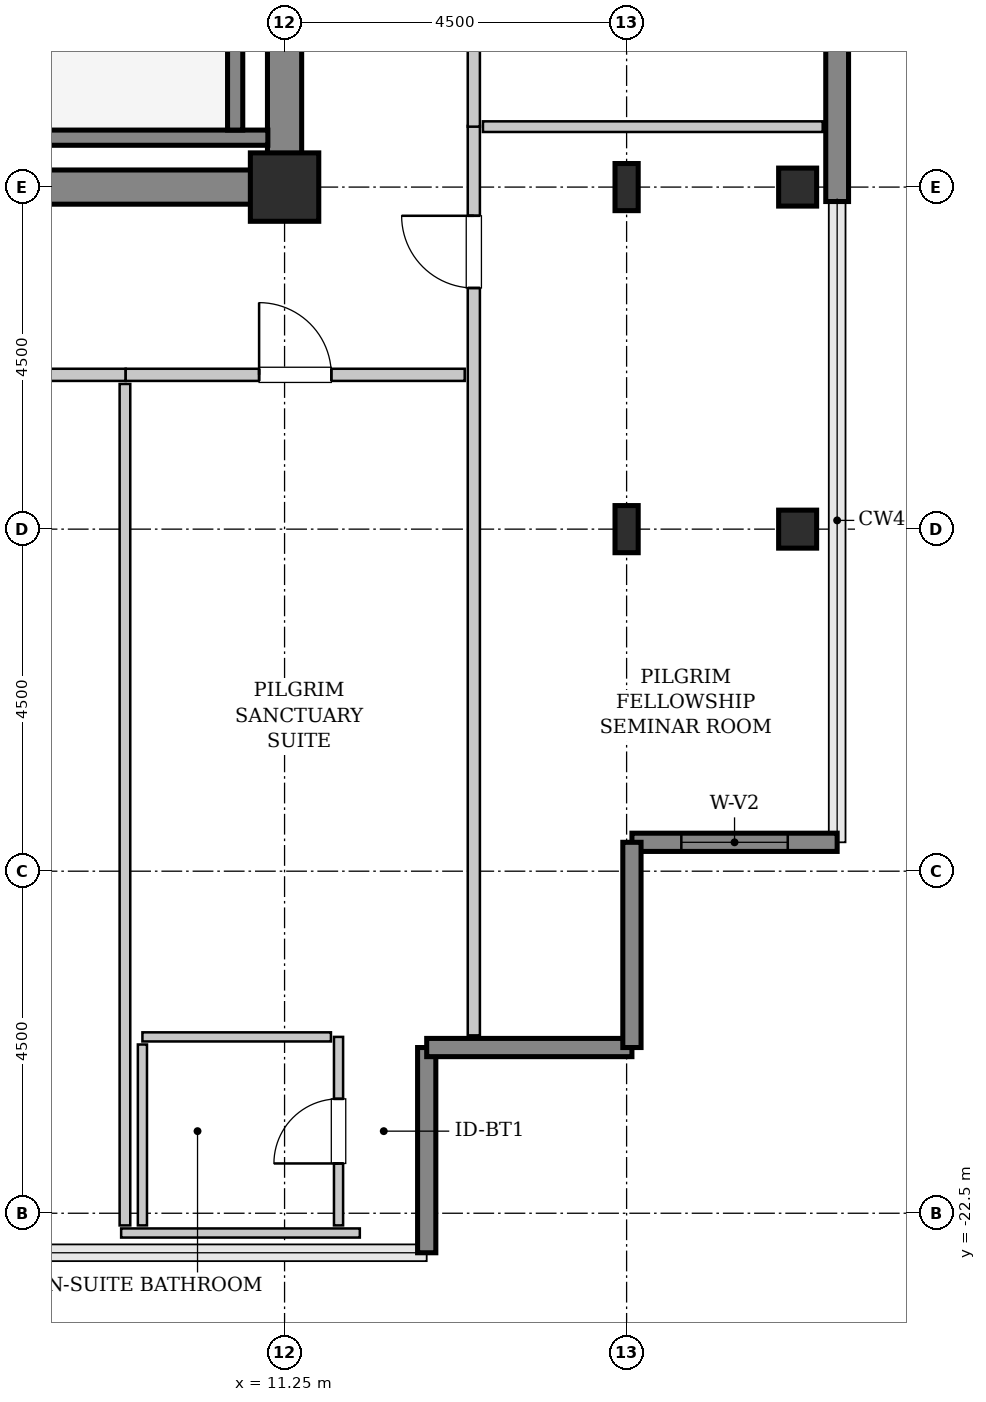
"""IFC4 building model, lengths in metres.
Left out: names, types, materials, properties, quantities, classifications, styles, units other than length and angle.
Written with IfcOpenShell. Run it as: python <this file> out.ifc"""

import sys

from ifc_helpers import new_model, si_unit, direction, frame, frame_2d, origin, origin_2d, place, context, subcontext, project, spatial, rectangle, hollow_rectangle, i_section, extrude, source, transform, mapped, element, fill, save


model = new_model("IFC4")
c1 = context("Model", 3, precision=1e-05, world=origin(), true_north=direction((0.0, 1.0)))
c2 = subcontext(c1, "Body", "Model", "MODEL_VIEW")
j1 = project(units=[si_unit("LENGTHUNIT", "METRE"), si_unit("PLANEANGLEUNIT", "RADIAN")], contexts=[c1])
p1 = place(None, origin())
s1 = spatial("IfcSite", under=j1, at=p1, CompositionType="ELEMENT")
p2 = place(p1, origin())
s2 = spatial("IfcBuilding", under=s1, at=p2, CompositionType="ELEMENT")
p3 = place(p2, frame((0.0, 0.0, 310.2)))
s3 = spatial("IfcBuildingStorey", under=s2, at=p3, CompositionType="ELEMENT", Elevation=310.2)
m1 = source(origin(), c2, "Body", "SweptSolid", [
    extrude(rectangle(XDim=9.925, YDim=0.45, at=frame_2d((4.962, 0.0))), origin(), (0.0, 0.0, 1.0), 3.8),
])
p4 = place(p3, frame((1.55, -9.0, 0.0), z_axis=(0.0, 0.0, 1.0), x_axis=(1.0, 0.0, 0.0)))
e1 = element("IfcWall", 1, at=p4, inside=s3, PredefinedType="SHEAR", context=c2, shape_type="MappedRepresentation", body=[
    mapped(m1, transform((0.0, 0.0, 0.0), x_axis=(1.0, 0.0, 0.0), y_axis=(0.0, 1.0, 0.0), z_axis=(0.0, 0.0, 1.0), scale=1.0)),
])
m2 = source(origin(), c2, "Body", "SweptSolid", [
    extrude(rectangle(XDim=7.425, YDim=0.45, at=frame_2d((3.712, 0.0))), origin(), (0.0, 0.0, 1.0), 3.8),
])
p5 = place(p3, frame((11.25, -8.775, 0.0), z_axis=(0.0, 0.0, 1.0), x_axis=(0.0, 1.0, 0.0)))
e2 = element("IfcWall", 2, at=p5, inside=s3, PredefinedType="SHEAR", context=c2, shape_type="MappedRepresentation", body=[
    mapped(m2, transform((0.0, 0.0, 0.0), x_axis=(1.0, 0.0, 0.0), y_axis=(0.0, 1.0, 0.0), z_axis=(0.0, 0.0, 1.0), scale=1.0)),
])
m3 = source(origin(), c2, "Body", "SweptSolid", [
    extrude(rectangle(XDim=0.9, YDim=0.9, at=origin_2d()), origin(), (0.0, 0.0, 1.0), 3.8),
])
p6 = place(p3, frame((11.25, -9.0, 0.0), z_axis=(0.0, 0.0, 1.0), x_axis=(1.0, 0.0, 0.0)))
e3 = element("IfcColumn", 3, at=p6, inside=s3, PredefinedType="COLUMN", context=c2, shape_type="MappedRepresentation", body=[
    mapped(m3, transform((0.0, 0.0, 0.0), x_axis=(1.0, 0.0, 0.0), y_axis=(0.0, 1.0, 0.0), z_axis=(0.0, 0.0, 1.0), scale=1.0)),
])
m4 = source(origin(), c2, "Body", "SweptSolid", [
    extrude(i_section(OverallWidth=0.305, OverallDepth=0.62, WebThickness=0.021, FlangeThickness=0.04, FilletRadius=0.027, at=origin_2d()), origin(), (0.0, 0.0, 1.0), 3.8),
])
for number, where, z_axis, x_axis in (
    (4, (15.75, -13.5, 0.0), (0.0, 0.0, 1.0), (1.0, 0.0, 0.0)),
    (5, (15.75, -9.0, 0.0), (0.0, 0.0, 1.0), (1.0, 0.0, 0.0)),
):
    element("IfcColumn", number, at=place(p3, frame(where, z_axis=z_axis, x_axis=x_axis)), inside=s3, PredefinedType="COLUMN", context=c2, shape_type="MappedRepresentation", body=[
        mapped(m4, transform((0.0, 0.0, 0.0), x_axis=(1.0, 0.0, 0.0), y_axis=(0.0, 1.0, 0.0), z_axis=(0.0, 0.0, 1.0), scale=1.0)),
    ])
m5 = source(origin(), c2, "Body", "SweptSolid", [
    extrude(hollow_rectangle(XDim=0.5, YDim=0.5, WallThickness=0.025, InnerFilletRadius=0.025, OuterFilletRadius=0.05, at=origin_2d()), origin(), (0.0, 0.0, 1.0), 3.8),
])
for number, where, z_axis, x_axis in (
    (6, (18.0, -13.5, 0.0), (0.0, 0.0, 1.0), (1.0, 0.0, 0.0)),
    (7, (18.0, -9.0, 0.0), (0.0, 0.0, 1.0), (1.0, 0.0, 0.0)),
):
    element("IfcColumn", number, at=place(p3, frame(where, z_axis=z_axis, x_axis=x_axis)), inside=s3, PredefinedType="COLUMN", context=c2, shape_type="MappedRepresentation", body=[
        mapped(m5, transform((0.0, 0.0, 0.0), x_axis=(1.0, 0.0, 0.0), y_axis=(0.0, 1.0, 0.0), z_axis=(0.0, 0.0, 1.0), scale=1.0)),
    ])
m6 = source(origin(), c2, "Body", "SweptSolid", [
    extrude(rectangle(XDim=4.88, YDim=0.3, at=frame_2d((2.44, 0.0))), origin(), (0.0, 0.0, 1.0), 3.55),
])
p7 = place(p3, frame((18.52, -9.19, 0.0), z_axis=(0.0, 0.0, 1.0), x_axis=(0.0, 1.0, 0.0)))
e8 = element("IfcWall", 8, at=p7, inside=s3, PredefinedType="SHEAR", context=c2, shape_type="MappedRepresentation", body=[
    mapped(m6, transform((0.0, 0.0, 0.0), x_axis=(1.0, 0.0, 0.0), y_axis=(0.0, 1.0, 0.0), z_axis=(0.0, 0.0, 1.0), scale=1.0)),
])
m7 = source(origin(), c2, "Body", "SweptSolid", [
    extrude(rectangle(XDim=2.7, YDim=0.24, at=frame_2d((1.35, 0.0))), origin(), (0.0, 0.0, 1.0), 3.55),
])
p8 = place(p3, frame((15.82, -17.62, 0.0), z_axis=(0.0, 0.0, 1.0), x_axis=(1.0, 0.0, 0.0)))
e9 = element("IfcWall", 9, at=p8, inside=s3, PredefinedType="SHEAR", context=c2, shape_type="MappedRepresentation", body=[
    mapped(m7, transform((0.0, 0.0, 0.0), x_axis=(1.0, 0.0, 0.0), y_axis=(0.0, 1.0, 0.0), z_axis=(0.0, 0.0, 1.0), scale=1.0)),
])
p9 = place(p8, frame((0.65, 0.0, 0.85)))
e10 = element("IfcOpeningElement", 10, at=p9, cuts=e9, PredefinedType="OPENING", context=c2, shape_type="SweptSolid", body=[
    extrude(rectangle(XDim=1.4, YDim=1.8, at=frame_2d((0.7, 0.9))), frame((0.0, 0.13, 0.0), z_axis=(0.0, -1.0, 0.0), x_axis=(1.0, 0.0, 0.0)), (0.0, 0.0, 1.0), 0.26),
])
for number, where, z_axis, x_axis in (
    (11, (13.12, -23.02, 0.0), (0.0, 0.0, 1.0), (0.0, 1.0, 0.0)),
    (12, (13.12, -20.32, 0.0), (0.0, 0.0, 1.0), (1.0, 0.0, 0.0)),
    (13, (15.82, -20.32, 0.0), (0.0, 0.0, 1.0), (0.0, 1.0, 0.0)),
):
    element("IfcWall", number, at=place(p3, frame(where, z_axis=z_axis, x_axis=x_axis)), inside=s3, PredefinedType="SHEAR", context=c2, shape_type="MappedRepresentation", body=[
        mapped(m7, transform((0.0, 0.0, 0.0), x_axis=(1.0, 0.0, 0.0), y_axis=(0.0, 1.0, 0.0), z_axis=(0.0, 0.0, 1.0), scale=1.0)),
    ])
m8 = source(origin(), c2, "Body", "SweptSolid", [
    extrude(rectangle(XDim=3.73, YDim=0.2, at=frame_2d((1.865, 0.0))), origin(), (0.0, 0.0, 1.0), 3.8),
])
p10 = place(p3, frame((7.3, -8.35, 0.0), z_axis=(0.0, 0.0, 1.0), x_axis=(1.0, 0.0, 0.0)))
e14 = element("IfcWall", 14, at=p10, inside=s3, PredefinedType="SOLIDWALL", context=c2, shape_type="MappedRepresentation", body=[
    mapped(m8, transform((0.0, 0.0, 0.0), x_axis=(1.0, 0.0, 0.0), y_axis=(0.0, 1.0, 0.0), z_axis=(0.0, 0.0, 1.0), scale=1.0)),
])
m9 = source(origin(), c2, "Body", "SweptSolid", [
    extrude(rectangle(XDim=7.1, YDim=0.2, at=frame_2d((3.55, 0.0))), origin(), (0.0, 0.0, 1.0), 3.8),
])
p11 = place(p3, frame((10.6, -1.15, 0.0), z_axis=(0.0, 0.0, 1.0), x_axis=(0.0, -1.0, 0.0)))
e15 = element("IfcWall", 15, at=p11, inside=s3, PredefinedType="SOLIDWALL", context=c2, shape_type="MappedRepresentation", body=[
    mapped(m9, transform((0.0, 0.0, 0.0), x_axis=(1.0, 0.0, 0.0), y_axis=(0.0, 1.0, 0.0), z_axis=(0.0, 0.0, 1.0), scale=1.0)),
])
m10 = source(origin(), c2, "Body", "SweptSolid", [
    extrude(rectangle(XDim=3.14, YDim=0.12, at=frame_2d((1.57, 0.0))), origin(), (0.0, 0.0, 1.0), 3.535),
])
p12 = place(p3, frame((9.1, -22.76, 0.0), z_axis=(0.0, 0.0, 1.0), x_axis=(1.0, 0.0, 0.0)))
e16 = element("IfcWall", 16, at=p12, inside=s3, PredefinedType="PLUMBINGWALL", context=c2, shape_type="MappedRepresentation", body=[
    mapped(m10, transform((0.0, 0.0, 0.0), x_axis=(1.0, 0.0, 0.0), y_axis=(0.0, 1.0, 0.0), z_axis=(0.0, 0.0, 1.0), scale=1.0)),
])
m11 = source(origin(), c2, "Body", "SweptSolid", [
    extrude(rectangle(XDim=2.48, YDim=0.12, at=frame_2d((1.24, 0.0))), origin(), (0.0, 0.0, 1.0), 3.535),
])
p13 = place(p3, frame((11.96, -22.66, 0.0), z_axis=(0.0, 0.0, 1.0), x_axis=(0.0, 1.0, 0.0)))
e17 = element("IfcWall", 17, at=p13, inside=s3, PredefinedType="PLUMBINGWALL", context=c2, shape_type="MappedRepresentation", body=[
    mapped(m11, transform((0.0, 0.0, 0.0), x_axis=(1.0, 0.0, 0.0), y_axis=(0.0, 1.0, 0.0), z_axis=(0.0, 0.0, 1.0), scale=1.0)),
])
p14 = place(p13, frame((0.815, 0.0, 0.0)))
e18 = element("IfcOpeningElement", 18, at=p14, cuts=e17, PredefinedType="OPENING", context=c2, shape_type="SweptSolid", body=[
    extrude(rectangle(XDim=0.85, YDim=2.1, at=frame_2d((0.425, 1.05))), frame((0.0, 0.07, 0.0), z_axis=(0.0, -1.0, 0.0), x_axis=(1.0, 0.0, 0.0)), (0.0, 0.0, 1.0), 0.14),
])
m12 = source(origin(), c2, "Body", "SweptSolid", [
    extrude(rectangle(XDim=2.48, YDim=0.12, at=frame_2d((1.24, 0.0))), origin(), (0.0, 0.0, 1.0), 3.535),
])
p15 = place(p3, frame((9.38, -20.18, 0.0), z_axis=(0.0, 0.0, 1.0), x_axis=(1.0, 0.0, 0.0)))
e19 = element("IfcWall", 19, at=p15, inside=s3, PredefinedType="PLUMBINGWALL", context=c2, shape_type="MappedRepresentation", body=[
    mapped(m12, transform((0.0, 0.0, 0.0), x_axis=(1.0, 0.0, 0.0), y_axis=(0.0, 1.0, 0.0), z_axis=(0.0, 0.0, 1.0), scale=1.0)),
])
m13 = source(origin(), c2, "Body", "SweptSolid", [
    extrude(rectangle(XDim=2.38, YDim=0.12, at=frame_2d((1.19, 0.0))), origin(), (0.0, 0.0, 1.0), 3.535),
])
p16 = place(p3, frame((9.38, -22.66, 0.0), z_axis=(0.0, 0.0, 1.0), x_axis=(0.0, 1.0, 0.0)))
e20 = element("IfcWall", 20, at=p16, inside=s3, PredefinedType="PLUMBINGWALL", context=c2, shape_type="MappedRepresentation", body=[
    mapped(m13, transform((0.0, 0.0, 0.0), x_axis=(1.0, 0.0, 0.0), y_axis=(0.0, 1.0, 0.0), z_axis=(0.0, 0.0, 1.0), scale=1.0)),
])
m14 = source(origin(), c2, "Body", "SweptSolid", [
    extrude(rectangle(XDim=11.965, YDim=0.16, at=frame_2d((5.982, 0.0))), origin(), (0.0, 0.0, 1.0), 3.535),
])
p17 = place(p3, frame((13.74, -20.16, 0.0), z_axis=(0.0, 0.0, 1.0), x_axis=(0.0, 1.0, 0.0)))
e21 = element("IfcWall", 21, at=p17, inside=s3, PredefinedType="PARTITIONING", context=c2, shape_type="MappedRepresentation", body=[
    mapped(m14, transform((0.0, 0.0, 0.0), x_axis=(1.0, 0.0, 0.0), y_axis=(0.0, 1.0, 0.0), z_axis=(0.0, 0.0, 1.0), scale=1.0)),
])
p18 = place(p17, frame((9.833, 0.0, 0.0)))
e22 = element("IfcOpeningElement", 22, at=p18, cuts=e21, PredefinedType="OPENING", context=c2, shape_type="SweptSolid", body=[
    extrude(rectangle(XDim=0.95, YDim=2.1, at=frame_2d((0.475, 1.05))), frame((0.0, 0.09, 0.0), z_axis=(0.0, -1.0, 0.0), x_axis=(1.0, 0.0, 0.0)), (0.0, 0.0, 1.0), 0.18),
])
m15 = source(origin(), c2, "Body", "SweptSolid", [
    extrude(rectangle(XDim=4.47, YDim=0.14, at=frame_2d((2.235, 0.0))), origin(), (0.0, 0.0, 1.0), 3.535),
])
p19 = place(p3, frame((13.86, -8.205, 0.0), z_axis=(0.0, 0.0, 1.0), x_axis=(1.0, 0.0, 0.0)))
e23 = element("IfcWall", 23, at=p19, inside=s3, PredefinedType="PARTITIONING", context=c2, shape_type="MappedRepresentation", body=[
    mapped(m15, transform((0.0, 0.0, 0.0), x_axis=(1.0, 0.0, 0.0), y_axis=(0.0, 1.0, 0.0), z_axis=(0.0, 0.0, 1.0), scale=1.0)),
])
m16 = source(origin(), c2, "Body", "SweptSolid", [
    extrude(rectangle(XDim=8.01, YDim=0.16, at=frame_2d((4.005, 0.0))), origin(), (0.0, 0.0, 1.0), 3.535),
])
p20 = place(p3, frame((13.74, -8.205, 0.0), z_axis=(0.0, 0.0, 1.0), x_axis=(0.0, 1.0, 0.0)))
e24 = element("IfcWall", 24, at=p20, inside=s3, PredefinedType="PARTITIONING", context=c2, shape_type="MappedRepresentation", body=[
    mapped(m16, transform((0.0, 0.0, 0.0), x_axis=(1.0, 0.0, 0.0), y_axis=(0.0, 1.0, 0.0), z_axis=(0.0, 0.0, 1.0), scale=1.0)),
])
p21 = place(p20, frame((3.53, 0.0, 0.0)))
e25 = element("IfcOpeningElement", 25, at=p21, cuts=e24, PredefinedType="OPENING", context=c2, shape_type="SweptSolid", body=[
    extrude(rectangle(XDim=0.95, YDim=2.1, at=frame_2d((0.475, 1.05))), frame((0.0, 0.09, 0.0), z_axis=(0.0, -1.0, 0.0), x_axis=(1.0, 0.0, 0.0)), (0.0, 0.0, 1.0), 0.18),
])
m17 = source(origin(), c2, "Body", "SweptSolid", [
    extrude(rectangle(XDim=4.565, YDim=0.16, at=frame_2d((2.282, 0.0))), origin(), (0.0, 0.0, 1.0), 3.535),
])
p22 = place(p3, frame((4.595, -11.47, 0.0), z_axis=(0.0, 0.0, 1.0), x_axis=(1.0, 0.0, 0.0)))
e26 = element("IfcWall", 26, at=p22, inside=s3, PredefinedType="PARTITIONING", context=c2, shape_type="MappedRepresentation", body=[
    mapped(m17, transform((0.0, 0.0, 0.0), x_axis=(1.0, 0.0, 0.0), y_axis=(0.0, 1.0, 0.0), z_axis=(0.0, 0.0, 1.0), scale=1.0)),
])
p23 = place(p22, frame((1.808, 0.0, 0.0)))
e27 = element("IfcOpeningElement", 27, at=p23, cuts=e26, PredefinedType="OPENING", context=c2, shape_type="SweptSolid", body=[
    extrude(rectangle(XDim=0.95, YDim=2.1, at=frame_2d((0.475, 1.05))), frame((0.0, 0.09, 0.0), z_axis=(0.0, -1.0, 0.0), x_axis=(1.0, 0.0, 0.0)), (0.0, 0.0, 1.0), 0.18),
])
m18 = source(origin(), c2, "Body", "SweptSolid", [
    extrude(rectangle(XDim=11.07, YDim=0.14, at=frame_2d((5.535, 0.0))), origin(), (0.0, 0.0, 1.0), 3.535),
])
p24 = place(p3, frame((9.15, -22.66, 0.0), z_axis=(0.0, 0.0, 1.0), x_axis=(0.0, 1.0, 0.0)))
e28 = element("IfcWall", 28, at=p24, inside=s3, PredefinedType="PARTITIONING", context=c2, shape_type="MappedRepresentation", body=[
    mapped(m18, transform((0.0, 0.0, 0.0), x_axis=(1.0, 0.0, 0.0), y_axis=(0.0, 1.0, 0.0), z_axis=(0.0, 0.0, 1.0), scale=1.0)),
])
m19 = source(origin(), c2, "Body", "SweptSolid", [
    extrude(rectangle(XDim=4.46, YDim=0.16, at=frame_2d((2.23, 0.0))), origin(), (0.0, 0.0, 1.0), 3.535),
])
p25 = place(p3, frame((9.16, -11.47, 0.0), z_axis=(0.0, 0.0, 1.0), x_axis=(1.0, 0.0, 0.0)))
e29 = element("IfcWall", 29, at=p25, inside=s3, PredefinedType="PARTITIONING", context=c2, shape_type="MappedRepresentation", body=[
    mapped(m19, transform((0.0, 0.0, 0.0), x_axis=(1.0, 0.0, 0.0), y_axis=(0.0, 1.0, 0.0), z_axis=(0.0, 0.0, 1.0), scale=1.0)),
])
p26 = place(p25, frame((1.755, 0.0, 0.0)))
e30 = element("IfcOpeningElement", 30, at=p26, cuts=e29, PredefinedType="OPENING", context=c2, shape_type="SweptSolid", body=[
    extrude(rectangle(XDim=0.95, YDim=2.1, at=frame_2d((0.475, 1.05))), frame((0.0, 0.09, 0.0), z_axis=(0.0, -1.0, 0.0), x_axis=(1.0, 0.0, 0.0)), (0.0, 0.0, 1.0), 0.18),
])
m20 = source(origin(), c2, "Body", "SweptSolid", [
    extrude(rectangle(XDim=1.4, YDim=1.8, at=frame_2d((0.7, 0.9))), frame((0.0, 0.03, 0.0), z_axis=(0.0, -1.0, 0.0), x_axis=(1.0, 0.0, 0.0)), (0.0, 0.0, 1.0), 0.06),
])
p27 = place(p9, origin())
e31 = element("IfcWindow", 31, at=p27, inside=s3, PartitioningType="SINGLE_PANEL", PredefinedType="WINDOW", context=c2, shape_type="MappedRepresentation", body=[
    mapped(m20, transform((0.0, 0.0, 0.0), x_axis=(1.0, 0.0, 0.0), y_axis=(0.0, 1.0, 0.0), z_axis=(0.0, 0.0, 1.0), scale=1.0)),
])
fill(e10, e31)
m21 = source(origin(), c2, "Body", "SweptSolid", [
    extrude(rectangle(XDim=0.85, YDim=2.1, at=frame_2d((0.425, 1.05))), frame((0.0, 0.025, 0.0), z_axis=(0.0, -1.0, 0.0), x_axis=(1.0, 0.0, 0.0)), (0.0, 0.0, 1.0), 0.05),
])
p28 = place(p14, origin())
e32 = element("IfcDoor", 32, at=p28, inside=s3, OperationType="SINGLE_SWING_LEFT", PredefinedType="DOOR", context=c2, shape_type="MappedRepresentation", body=[
    mapped(m21, transform((0.0, 0.0, 0.0), x_axis=(1.0, 0.0, 0.0), y_axis=(0.0, 1.0, 0.0), z_axis=(0.0, 0.0, 1.0), scale=1.0)),
])
fill(e18, e32)
m22 = source(origin(), c2, "Body", "SweptSolid", [
    extrude(rectangle(XDim=0.95, YDim=2.1, at=frame_2d((0.475, 1.05))), frame((0.0, 0.025, 0.0), z_axis=(0.0, -1.0, 0.0), x_axis=(1.0, 0.0, 0.0)), (0.0, 0.0, 1.0), 0.05),
])
p29 = place(p18, origin())
e33 = element("IfcDoor", 33, at=p29, inside=s3, OperationType="SINGLE_SWING_RIGHT", PredefinedType="DOOR", context=c2, shape_type="MappedRepresentation", body=[
    mapped(m22, transform((0.0, 0.0, 0.0), x_axis=(1.0, 0.0, 0.0), y_axis=(0.0, 1.0, 0.0), z_axis=(0.0, 0.0, 1.0), scale=1.0)),
])
fill(e22, e33)
p30 = place(p26, origin())
e34 = element("IfcDoor", 34, at=p30, inside=s3, OperationType="SINGLE_SWING_LEFT", PredefinedType="DOOR", context=c2, shape_type="MappedRepresentation", body=[
    mapped(m22, transform((0.0, 0.0, 0.0), x_axis=(1.0, 0.0, 0.0), y_axis=(0.0, 1.0, 0.0), z_axis=(0.0, 0.0, 1.0), scale=1.0)),
])
fill(e30, e34)
save(model, sys.argv[1])
